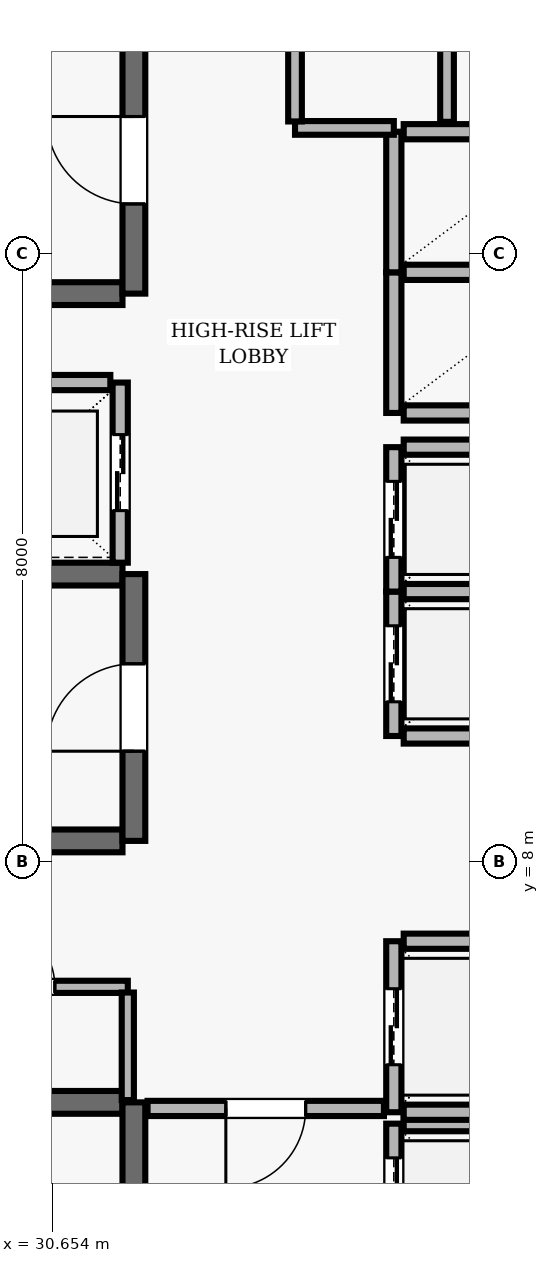
"""IFC4 building model, lengths in metres.
Left out: names, types, materials, properties, quantities, classifications, styles, units other than length and angle.
Written with IfcOpenShell. Run it as: python <this file> out.ifc"""

import sys

from ifc_helpers import new_model, si_unit, direction, frame, frame_2d, origin, place, context, subcontext, project, spatial, rectangle, extrude, element, fill, save


model = new_model("IFC4")
c1 = context("Model", 3, precision=1e-05, world=origin(), true_north=direction((0.0, 1.0)))
c2 = subcontext(c1, "Body", "Model", "MODEL_VIEW")
j1 = project(units=[si_unit("LENGTHUNIT", "METRE"), si_unit("PLANEANGLEUNIT", "RADIAN")], contexts=[c1])
p1 = place(None, origin())
s1 = spatial("IfcSite", under=j1, at=p1, CompositionType="ELEMENT")
p2 = place(p1, origin())
s2 = spatial("IfcBuilding", under=s1, at=p2, CompositionType="ELEMENT")
p3 = place(p2, frame((0.0, 0.0, 183.6)))
s3 = spatial("IfcBuildingStorey", under=s2, at=p3, CompositionType="ELEMENT", Elevation=183.6)
p4 = place(p3, frame((31.58, 4.83, 0.0), z_axis=(0.0, 0.0, 1.0), x_axis=(-1.0, 0.0, 0.0)))
e1 = element("IfcWall", 1, at=p4, inside=s3, PredefinedType="SHEAR", context=c2, shape_type="SweptSolid", body=[
    extrude(rectangle(XDim=8.36, YDim=0.3, at=frame_2d((4.18, 0.0))), origin(), (0.0, 0.0, 1.0), 3.69),
])
p5 = place(p3, frame((31.73, 0.96, 0.0), z_axis=(0.0, 0.0, 1.0), x_axis=(0.0, 1.0, 0.0)))
e2 = element("IfcWall", 2, at=p5, inside=s3, PredefinedType="SHEAR", context=c2, shape_type="SweptSolid", body=[
    extrude(rectangle(XDim=3.87, YDim=0.3, at=frame_2d((1.935, 0.0))), origin(), (0.0, 0.0, 1.0), 3.69),
])
p6 = place(p5, frame((1.54, 0.0, 0.0)))
e3 = element("IfcOpeningElement", 3, at=p6, cuts=e2, PredefinedType="OPENING", context=c2, shape_type="SweptSolid", body=[
    extrude(rectangle(XDim=1.15, YDim=2.15, at=frame_2d((0.575, 1.075))), frame((0.0, 0.16, 0.0), z_axis=(0.0, -1.0, 0.0), x_axis=(1.0, 0.0, 0.0)), (0.0, 0.0, 1.0), 0.32),
])
p7 = place(p3, frame((23.22, 15.47, 0.0), z_axis=(0.0, 0.0, 1.0), x_axis=(1.0, 0.0, 0.0)))
e4 = element("IfcWall", 4, at=p7, inside=s3, PredefinedType="SHEAR", context=c2, shape_type="SweptSolid", body=[
    extrude(rectangle(XDim=8.36, YDim=0.3, at=frame_2d((4.18, 0.0))), origin(), (0.0, 0.0, 1.0), 3.69),
])
p8 = place(p3, frame((31.73, 15.47, 0.0), z_axis=(0.0, 0.0, 1.0), x_axis=(0.0, 1.0, 0.0)))
e5 = element("IfcWall", 5, at=p8, inside=s3, PredefinedType="SHEAR", context=c2, shape_type="SweptSolid", body=[
    extrude(rectangle(XDim=3.51, YDim=0.3, at=frame_2d((1.755, 0.0))), origin(), (0.0, 0.0, 1.0), 3.69),
])
p9 = place(p8, frame((1.18, 0.0, 0.0)))
e6 = element("IfcOpeningElement", 6, at=p9, cuts=e5, PredefinedType="OPENING", context=c2, shape_type="SweptSolid", body=[
    extrude(rectangle(XDim=1.15, YDim=2.15, at=frame_2d((0.575, 1.075))), frame((0.0, 0.16, 0.0), z_axis=(0.0, -1.0, 0.0), x_axis=(1.0, 0.0, 0.0)), (0.0, 0.0, 1.0), 0.32),
])
for number, where, z_axis, x_axis in (
    (7, (31.58, 11.78, 0.0), (0.0, 0.0, 1.0), (-1.0, 0.0, 0.0)),
    (8, (23.22, 8.27, 0.0), (0.0, 0.0, 1.0), (1.0, 0.0, 0.0)),
):
    element("IfcWall", number, at=place(p3, frame(where, z_axis=z_axis, x_axis=x_axis)), inside=s3, PredefinedType="SHEAR", context=c2, shape_type="SweptSolid", body=[
        extrude(rectangle(XDim=8.36, YDim=0.3, at=frame_2d((4.18, 0.0))), origin(), (0.0, 0.0, 1.0), 3.69),
    ])
p10 = place(p3, frame((31.73, 8.27, 0.0), z_axis=(0.0, 0.0, 1.0), x_axis=(0.0, 1.0, 0.0)))
e9 = element("IfcWall", 9, at=p10, inside=s3, PredefinedType="SHEAR", context=c2, shape_type="SweptSolid", body=[
    extrude(rectangle(XDim=3.51, YDim=0.3, at=frame_2d((1.755, 0.0))), origin(), (0.0, 0.0, 1.0), 3.69),
])
p11 = place(p10, frame((1.18, 0.0, 0.0)))
e10 = element("IfcOpeningElement", 10, at=p11, cuts=e9, PredefinedType="OPENING", context=c2, shape_type="SweptSolid", body=[
    extrude(rectangle(XDim=1.15, YDim=2.15, at=frame_2d((0.575, 1.075))), frame((0.0, 0.16, 0.0), z_axis=(0.0, -1.0, 0.0), x_axis=(1.0, 0.0, 0.0)), (0.0, 0.0, 1.0), 0.32),
])
p12 = place(p3, frame((35.15, 4.55, 0.0), z_axis=(0.0, 0.0, 1.0), x_axis=(0.0, -1.0, 0.0)))
e11 = element("IfcWall", 11, at=p12, inside=s3, PredefinedType="SOLIDWALL", context=c2, shape_type="SweptSolid", body=[
    extrude(rectangle(XDim=2.1, YDim=0.2, at=frame_2d((1.05, 0.0))), origin(), (0.0, 0.0, 1.0), 3.69),
])
p13 = place(p12, frame((0.45, 0.0, 0.0)))
e12 = element("IfcOpeningElement", 12, at=p13, cuts=e11, PredefinedType="OPENING", context=c2, shape_type="SweptSolid", body=[
    extrude(rectangle(XDim=1.2, YDim=2.15, at=frame_2d((0.6, 1.075))), frame((0.0, 0.11, 0.0), z_axis=(0.0, -1.0, 0.0), x_axis=(1.0, 0.0, 0.0)), (0.0, 0.0, 1.0), 0.22),
])
p14 = place(p3, frame((37.42, 4.55, 0.0), z_axis=(0.0, 0.0, 1.0), x_axis=(-1.0, 0.0, 0.0)))
e13 = element("IfcWall", 13, at=p14, inside=s3, PredefinedType="SOLIDWALL", context=c2, shape_type="SweptSolid", body=[
    extrude(rectangle(XDim=2.14, YDim=0.2, at=frame_2d((1.07, 0.0))), origin(), (0.0, 0.0, 1.0), 3.69),
])
p15 = place(p3, frame((35.15, 6.95, 0.0), z_axis=(0.0, 0.0, 1.0), x_axis=(0.0, -1.0, 0.0)))
e14 = element("IfcWall", 14, at=p15, inside=s3, PredefinedType="SOLIDWALL", context=c2, shape_type="SweptSolid", body=[
    extrude(rectangle(XDim=2.25, YDim=0.2, at=frame_2d((1.125, 0.0))), origin(), (0.0, 0.0, 1.0), 3.69),
])
p16 = place(p15, frame((0.625, 0.0, 0.0)))
e15 = element("IfcOpeningElement", 15, at=p16, cuts=e14, PredefinedType="OPENING", context=c2, shape_type="SweptSolid", body=[
    extrude(rectangle(XDim=1.0, YDim=2.1, at=frame_2d((0.5, 1.05))), frame((0.0, 0.11, 0.0), z_axis=(0.0, -1.0, 0.0), x_axis=(1.0, 0.0, 0.0)), (0.0, 0.0, 1.0), 0.22),
])
for number, where, z_axis, x_axis in (
    (16, (35.28, 4.7, 0.0), (0.0, 0.0, 1.0), (1.0, 0.0, 0.0)),
    (17, (37.42, 6.95, 0.0), (0.0, 0.0, 1.0), (-1.0, 0.0, 0.0)),
):
    element("IfcWall", number, at=place(p3, frame(where, z_axis=z_axis, x_axis=x_axis)), inside=s3, PredefinedType="SOLIDWALL", context=c2, shape_type="SweptSolid", body=[
        extrude(rectangle(XDim=2.14, YDim=0.2, at=frame_2d((1.07, 0.0))), origin(), (0.0, 0.0, 1.0), 3.69),
    ])
p17 = place(p3, frame((35.15, 11.55, 0.0), z_axis=(0.0, 0.0, 1.0), x_axis=(0.0, -1.0, 0.0)))
e18 = element("IfcWall", 18, at=p17, inside=s3, PredefinedType="SOLIDWALL", context=c2, shape_type="SweptSolid", body=[
    extrude(rectangle(XDim=1.9, YDim=0.2, at=frame_2d((0.95, 0.0))), origin(), (0.0, 0.0, 1.0), 3.69),
])
p18 = place(p17, frame((0.45, 0.0, 0.0)))
e19 = element("IfcOpeningElement", 19, at=p18, cuts=e18, PredefinedType="OPENING", context=c2, shape_type="SweptSolid", body=[
    extrude(rectangle(XDim=1.0, YDim=2.1, at=frame_2d((0.5, 1.05))), frame((0.0, 0.11, 0.0), z_axis=(0.0, -1.0, 0.0), x_axis=(1.0, 0.0, 0.0)), (0.0, 0.0, 1.0), 0.22),
])
for number, where, z_axis, x_axis in (
    (20, (35.28, 9.65, 0.0), (0.0, 0.0, 1.0), (1.0, 0.0, 0.0)),
    (21, (37.42, 11.55, 0.0), (0.0, 0.0, 1.0), (-1.0, 0.0, 0.0)),
):
    element("IfcWall", number, at=place(p3, frame(where, z_axis=z_axis, x_axis=x_axis)), inside=s3, PredefinedType="SOLIDWALL", context=c2, shape_type="SweptSolid", body=[
        extrude(rectangle(XDim=2.14, YDim=0.2, at=frame_2d((1.07, 0.0))), origin(), (0.0, 0.0, 1.0), 3.69),
    ])
p19 = place(p3, frame((35.15, 13.45, 0.0), z_axis=(0.0, 0.0, 1.0), x_axis=(0.0, -1.0, 0.0)))
e22 = element("IfcWall", 22, at=p19, inside=s3, PredefinedType="SOLIDWALL", context=c2, shape_type="SweptSolid", body=[
    extrude(rectangle(XDim=1.9, YDim=0.2, at=frame_2d((0.95, 0.0))), origin(), (0.0, 0.0, 1.0), 3.69),
])
p20 = place(p19, frame((0.45, 0.0, 0.0)))
e23 = element("IfcOpeningElement", 23, at=p20, cuts=e22, PredefinedType="OPENING", context=c2, shape_type="SweptSolid", body=[
    extrude(rectangle(XDim=1.0, YDim=2.1, at=frame_2d((0.5, 1.05))), frame((0.0, 0.11, 0.0), z_axis=(0.0, -1.0, 0.0), x_axis=(1.0, 0.0, 0.0)), (0.0, 0.0, 1.0), 0.22),
])
p21 = place(p3, frame((37.42, 13.45, 0.0), z_axis=(0.0, 0.0, 1.0), x_axis=(-1.0, 0.0, 0.0)))
e24 = element("IfcWall", 24, at=p21, inside=s3, PredefinedType="SOLIDWALL", context=c2, shape_type="SweptSolid", body=[
    extrude(rectangle(XDim=2.14, YDim=0.2, at=frame_2d((1.07, 0.0))), origin(), (0.0, 0.0, 1.0), 3.69),
])
p22 = place(p3, frame((31.55, 11.93, 0.0), z_axis=(0.0, 0.0, 1.0), x_axis=(0.0, 1.0, 0.0)))
e25 = element("IfcWall", 25, at=p22, inside=s3, PredefinedType="SOLIDWALL", context=c2, shape_type="SweptSolid", body=[
    extrude(rectangle(XDim=2.37, YDim=0.2, at=frame_2d((1.185, 0.0))), origin(), (0.0, 0.0, 1.0), 3.69),
])
p23 = place(p22, frame((0.685, 0.0, 0.0)))
e26 = element("IfcOpeningElement", 26, at=p23, cuts=e25, PredefinedType="OPENING", context=c2, shape_type="SweptSolid", body=[
    extrude(rectangle(XDim=1.0, YDim=2.1, at=frame_2d((0.5, 1.05))), frame((0.0, 0.11, 0.0), z_axis=(0.0, -1.0, 0.0), x_axis=(1.0, 0.0, 0.0)), (0.0, 0.0, 1.0), 0.22),
])
p24 = place(p3, frame((31.42, 14.3, 0.0), z_axis=(0.0, 0.0, 1.0), x_axis=(-1.0, 0.0, 0.0)))
e27 = element("IfcWall", 27, at=p24, inside=s3, PredefinedType="SOLIDWALL", context=c2, shape_type="SweptSolid", body=[
    extrude(rectangle(XDim=2.44, YDim=0.2, at=frame_2d((1.22, 0.0))), origin(), (0.0, 0.0, 1.0), 3.69),
])
p25 = place(p3, frame((35.15, 15.75, 0.0), z_axis=(0.0, 0.0, 1.0), x_axis=(0.0, -1.0, 0.0)))
e28 = element("IfcWall", 28, at=p25, inside=s3, PredefinedType="SOLIDWALL", context=c2, shape_type="SweptSolid", body=[
    extrude(rectangle(XDim=1.85, YDim=0.2, at=frame_2d((0.925, 0.0))), origin(), (0.0, 0.0, 1.0), 3.69),
])
for number, where, z_axis, x_axis in (
    (29, (35.28, 13.9, 0.0), (0.0, 0.0, 1.0), (1.0, 0.0, 0.0)),
    (30, (37.42, 15.75, 0.0), (0.0, 0.0, 1.0), (-1.0, 0.0, 0.0)),
):
    element("IfcWall", number, at=place(p3, frame(where, z_axis=z_axis, x_axis=x_axis)), inside=s3, PredefinedType="SOLIDWALL", context=c2, shape_type="SweptSolid", body=[
        extrude(rectangle(XDim=2.14, YDim=0.2, at=frame_2d((1.07, 0.0))), origin(), (0.0, 0.0, 1.0), 3.69),
    ])
p26 = place(p3, frame((35.15, 17.6, 0.0), z_axis=(0.0, 0.0, 1.0), x_axis=(0.0, -1.0, 0.0)))
e31 = element("IfcWall", 31, at=p26, inside=s3, PredefinedType="SOLIDWALL", context=c2, shape_type="SweptSolid", body=[
    extrude(rectangle(XDim=1.85, YDim=0.2, at=frame_2d((0.925, 0.0))), origin(), (0.0, 0.0, 1.0), 3.69),
])
p27 = place(p3, frame((37.42, 17.6, 0.0), z_axis=(0.0, 0.0, 1.0), x_axis=(-1.0, 0.0, 0.0)))
e32 = element("IfcWall", 32, at=p27, inside=s3, PredefinedType="SOLIDWALL", context=c2, shape_type="SweptSolid", body=[
    extrude(rectangle(XDim=2.14, YDim=0.2, at=frame_2d((1.07, 0.0))), origin(), (0.0, 0.0, 1.0), 3.69),
])
p28 = place(p3, frame((28.85, 6.35, 0.0), z_axis=(0.0, 0.0, 1.0), x_axis=(1.0, 0.0, 0.0)))
e33 = element("IfcWall", 33, at=p28, inside=s3, PredefinedType="PARTITIONING", context=c2, shape_type="SweptSolid", body=[
    extrude(rectangle(XDim=2.8, YDim=0.16, at=frame_2d((1.4, 0.0))), origin(), (0.0, 0.0, 1.0), 3.69),
])
p29 = place(p28, frame((0.96, 0.0, 0.0)))
e34 = element("IfcOpeningElement", 34, at=p29, cuts=e33, PredefinedType="OPENING", context=c2, shape_type="SweptSolid", body=[
    extrude(rectangle(XDim=0.88, YDim=2.1, at=frame_2d((0.44, 1.05))), frame((0.0, 0.09, 0.0), z_axis=(0.0, -1.0, 0.0), x_axis=(1.0, 0.0, 0.0)), (0.0, 0.0, 1.0), 0.18),
])
p30 = place(p3, frame((33.85, 17.65, 0.0), z_axis=(0.0, 0.0, 1.0), x_axis=(1.0, 0.0, 0.0)))
e35 = element("IfcWall", 35, at=p30, inside=s3, PredefinedType="PARTITIONING", context=c2, shape_type="SweptSolid", body=[
    extrude(rectangle(XDim=1.3, YDim=0.18, at=frame_2d((0.65, 0.0))), origin(), (0.0, 0.0, 1.0), 3.69),
])
p31 = place(p3, frame((35.02, 4.75, 0.0), z_axis=(0.0, 0.0, 1.0), x_axis=(-1.0, 0.0, 0.0)))
e36 = element("IfcWall", 36, at=p31, inside=s3, PredefinedType="SOLIDWALL", context=c2, shape_type="SweptSolid", body=[
    extrude(rectangle(XDim=3.11, YDim=0.2, at=frame_2d((1.555, 0.0))), origin(), (0.0, 0.0, 1.0), 3.69),
])
p32 = place(p31, frame((1.03, 0.0, 0.0)))
e37 = element("IfcOpeningElement", 37, at=p32, cuts=e36, PredefinedType="OPENING", context=c2, shape_type="SweptSolid", body=[
    extrude(rectangle(XDim=1.05, YDim=2.15, at=frame_2d((0.525, 1.075))), frame((0.0, 0.11, 0.0), z_axis=(0.0, -1.0, 0.0), x_axis=(1.0, 0.0, 0.0)), (0.0, 0.0, 1.0), 0.22),
])
p33 = place(p3, frame((31.65, 4.86, 0.0), z_axis=(0.0, 0.0, 1.0), x_axis=(0.0, 1.0, 0.0)))
e38 = element("IfcWall", 38, at=p33, inside=s3, PredefinedType="PARTITIONING", context=c2, shape_type="SweptSolid", body=[
    extrude(rectangle(XDim=1.415, YDim=0.16, at=frame_2d((0.708, 0.0))), origin(), (0.0, 0.0, 1.0), 3.69),
])
p34 = place(p3, frame((33.85, 17.735, 0.0), z_axis=(0.0, 0.0, 1.0), x_axis=(0.0, 1.0, 0.0)))
e39 = element("IfcWall", 39, at=p34, inside=s3, PredefinedType="PARTITIONING", context=c2, shape_type="SweptSolid", body=[
    extrude(rectangle(XDim=6.03, YDim=0.18, at=frame_2d((3.015, 0.0))), origin(), (0.0, 0.0, 1.0), 3.69),
])
p35 = place(p34, frame((2.54, 0.0, 0.0)))
e40 = element("IfcOpeningElement", 40, at=p35, cuts=e39, PredefinedType="OPENING", context=c2, shape_type="SweptSolid", body=[
    extrude(rectangle(XDim=0.95, YDim=2.1, at=frame_2d((0.475, 1.05))), frame((0.0, 0.1, 0.0), z_axis=(0.0, -1.0, 0.0), x_axis=(1.0, 0.0, 0.0)), (0.0, 0.0, 1.0), 0.2),
])
p36 = place(p3, frame((35.85, 17.73, 0.0), z_axis=(0.0, 0.0, 1.0), x_axis=(0.0, 1.0, 0.0)))
e41 = element("IfcWall", 41, at=p36, inside=s3, PredefinedType="PARTITIONING", context=c2, shape_type="SweptSolid", body=[
    extrude(rectangle(XDim=3.412, YDim=0.18, at=frame_2d((1.706, 0.0))), origin(), (0.0, 0.0, 1.0), 3.69),
])
p37 = place(p36, frame((1.256, 0.0, 0.0)))
e42 = element("IfcOpeningElement", 42, at=p37, cuts=e41, PredefinedType="OPENING", context=c2, shape_type="SweptSolid", body=[
    extrude(rectangle(XDim=0.9, YDim=2.1, at=frame_2d((0.45, 1.05))), frame((0.0, 0.1, 0.0), z_axis=(0.0, -1.0, 0.0), x_axis=(1.0, 0.0, 0.0)), (0.0, 0.0, 1.0), 0.2),
])
p38 = place(p9, origin())
e43 = element("IfcDoor", 43, at=p38, inside=s3, OperationType="SINGLE_SWING_RIGHT", PredefinedType="DOOR", context=c2, shape_type="SweptSolid", body=[
    extrude(rectangle(XDim=1.15, YDim=2.15, at=frame_2d((0.575, 1.075))), frame((0.0, 0.025, 0.0), z_axis=(0.0, -1.0, 0.0), x_axis=(1.0, 0.0, 0.0)), (0.0, 0.0, 1.0), 0.05),
])
fill(e6, e43)
p39 = place(p11, origin())
e44 = element("IfcDoor", 44, at=p39, inside=s3, OperationType="SINGLE_SWING_LEFT", PredefinedType="DOOR", context=c2, shape_type="SweptSolid", body=[
    extrude(rectangle(XDim=1.15, YDim=2.15, at=frame_2d((0.575, 1.075))), frame((0.0, 0.025, 0.0), z_axis=(0.0, -1.0, 0.0), x_axis=(1.0, 0.0, 0.0)), (0.0, 0.0, 1.0), 0.05),
])
fill(e10, e44)
p40 = place(p13, origin())
e45 = element("IfcDoor", 45, at=p40, inside=s3, OperationType="DOUBLE_DOOR_SLIDING", PredefinedType="DOOR", context=c2, shape_type="SweptSolid", body=[
    extrude(rectangle(XDim=1.2, YDim=2.15, at=frame_2d((0.6, 1.075))), frame((0.0, 0.025, 0.0), z_axis=(0.0, -1.0, 0.0), x_axis=(1.0, 0.0, 0.0)), (0.0, 0.0, 1.0), 0.05),
])
fill(e12, e45)
p41 = place(p16, origin())
e46 = element("IfcDoor", 46, at=p41, inside=s3, OperationType="DOUBLE_DOOR_SLIDING", PredefinedType="DOOR", context=c2, shape_type="SweptSolid", body=[
    extrude(rectangle(XDim=1.0, YDim=2.1, at=frame_2d((0.5, 1.05))), frame((0.0, 0.025, 0.0), z_axis=(0.0, -1.0, 0.0), x_axis=(1.0, 0.0, 0.0)), (0.0, 0.0, 1.0), 0.05),
])
fill(e15, e46)
p42 = place(p18, origin())
e47 = element("IfcDoor", 47, at=p42, inside=s3, OperationType="DOUBLE_DOOR_SLIDING", PredefinedType="DOOR", context=c2, shape_type="SweptSolid", body=[
    extrude(rectangle(XDim=1.0, YDim=2.1, at=frame_2d((0.5, 1.05))), frame((0.0, 0.025, 0.0), z_axis=(0.0, -1.0, 0.0), x_axis=(1.0, 0.0, 0.0)), (0.0, 0.0, 1.0), 0.05),
])
fill(e19, e47)
p43 = place(p20, origin())
e48 = element("IfcDoor", 48, at=p43, inside=s3, OperationType="DOUBLE_DOOR_SLIDING", PredefinedType="DOOR", context=c2, shape_type="SweptSolid", body=[
    extrude(rectangle(XDim=1.0, YDim=2.1, at=frame_2d((0.5, 1.05))), frame((0.0, 0.025, 0.0), z_axis=(0.0, -1.0, 0.0), x_axis=(1.0, 0.0, 0.0)), (0.0, 0.0, 1.0), 0.05),
])
fill(e23, e48)
p44 = place(p23, origin())
e49 = element("IfcDoor", 49, at=p44, inside=s3, OperationType="DOUBLE_DOOR_SLIDING", PredefinedType="DOOR", context=c2, shape_type="SweptSolid", body=[
    extrude(rectangle(XDim=1.0, YDim=2.1, at=frame_2d((0.5, 1.05))), frame((0.0, 0.025, 0.0), z_axis=(0.0, -1.0, 0.0), x_axis=(1.0, 0.0, 0.0)), (0.0, 0.0, 1.0), 0.05),
])
fill(e26, e49)
p45 = place(p32, origin())
e50 = element("IfcDoor", 50, at=p45, inside=s3, OperationType="SINGLE_SWING_RIGHT", PredefinedType="DOOR", context=c2, shape_type="SweptSolid", body=[
    extrude(rectangle(XDim=1.05, YDim=2.15, at=frame_2d((0.525, 1.075))), frame((0.0, 0.025, 0.0), z_axis=(0.0, -1.0, 0.0), x_axis=(1.0, 0.0, 0.0)), (0.0, 0.0, 1.0), 0.05),
])
fill(e37, e50)
p46 = place(p29, origin())
e51 = element("IfcDoor", 51, at=p46, inside=s3, OperationType="SINGLE_SWING_LEFT", PredefinedType="DOOR", context=c2, shape_type="SweptSolid", body=[
    extrude(rectangle(XDim=0.88, YDim=2.1, at=frame_2d((0.44, 1.05))), frame((0.0, 0.025, 0.0), z_axis=(0.0, -1.0, 0.0), x_axis=(1.0, 0.0, 0.0)), (0.0, 0.0, 1.0), 0.05),
])
fill(e34, e51)
save(model, sys.argv[1])
